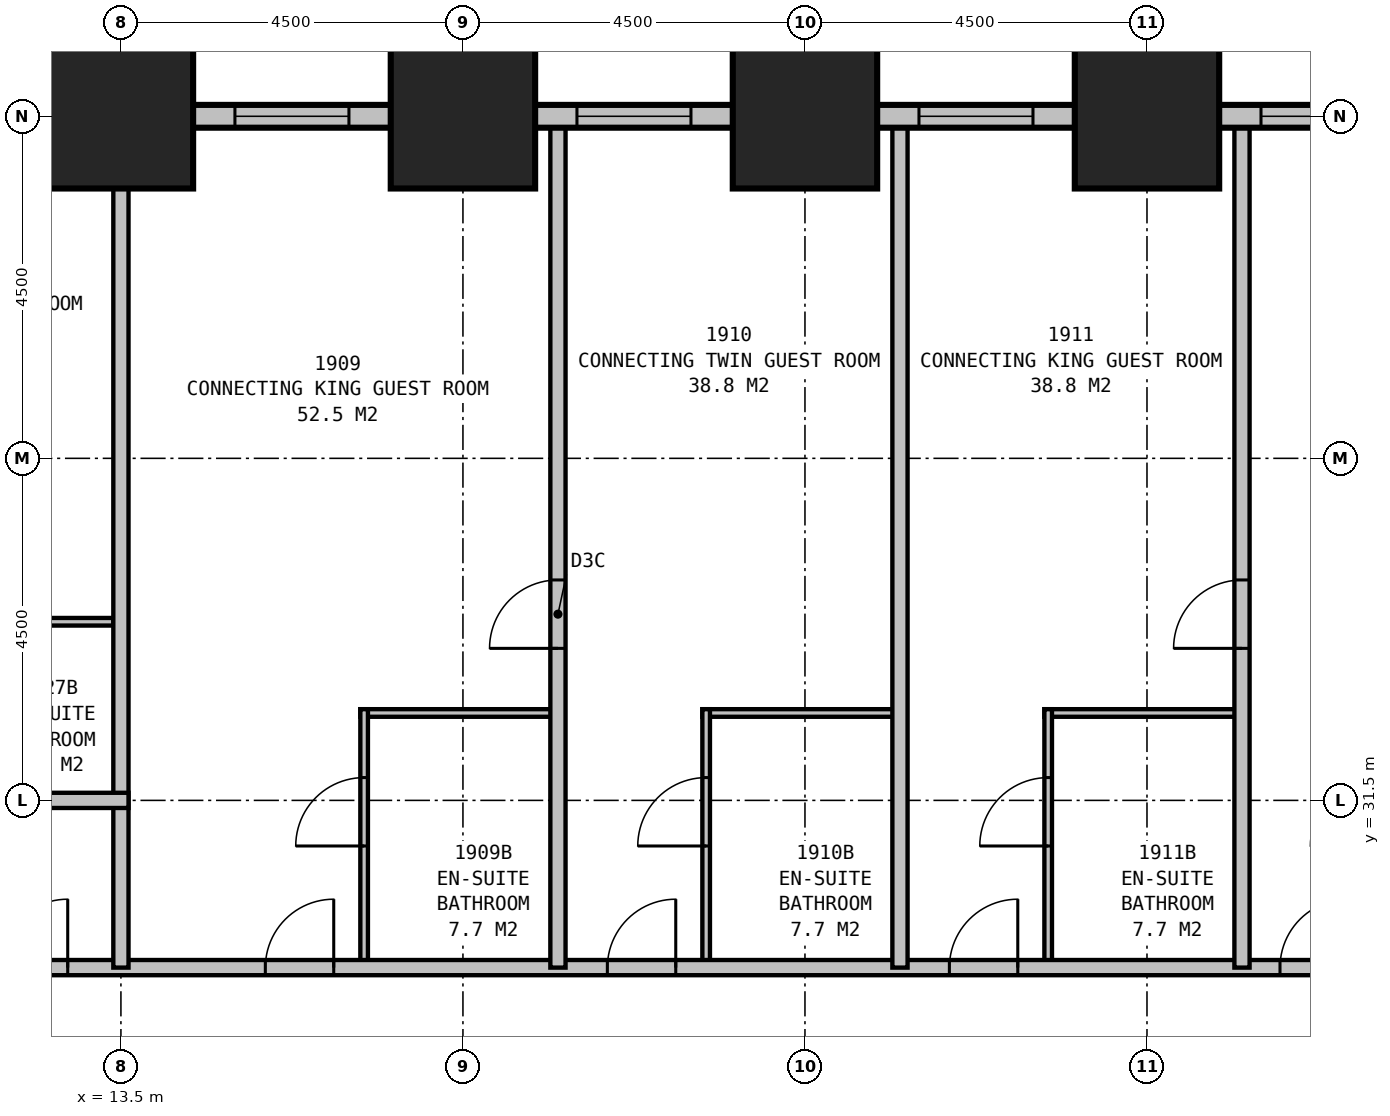
"""IFC4 building model, lengths in metres.
Left out: names, types, materials, properties, quantities, classifications, styles, units other than length and angle.
Written with IfcOpenShell. Run it as: python <this file> out.ifc"""

import sys

from ifc_helpers import new_model, si_unit, direction, frame, frame_2d, origin, origin_2d, place, context, subcontext, project, spatial, rectangle, extrude, element, fill, save


model = new_model("IFC4")
c1 = context("Model", 3, precision=1e-05, world=origin(), true_north=direction((0.0, 1.0)))
c2 = subcontext(c1, "Body", "Model", "MODEL_VIEW")
j1 = project(units=[si_unit("LENGTHUNIT", "METRE"), si_unit("PLANEANGLEUNIT", "RADIAN")], contexts=[c1])
p1 = place(None, origin())
s1 = spatial("IfcSite", under=j1, at=p1, CompositionType="ELEMENT")
p2 = place(p1, origin())
s2 = spatial("IfcBuilding", under=s1, at=p2, CompositionType="ELEMENT")
p3 = place(p2, frame((0.0, 0.0, 78.7)))
s3 = spatial("IfcBuildingStorey", under=s2, at=p3, CompositionType="ELEMENT", Elevation=78.7)
for number, where, z_axis, x_axis in (
    (1, (27.0, 40.5, 0.0), (0.0, 0.0, 1.0), (1.0, 0.0, 0.0)),
    (2, (22.5, 40.5, 0.0), (0.0, 0.0, 1.0), (1.0, 0.0, 0.0)),
    (3, (18.0, 40.5, 0.0), (0.0, 0.0, 1.0), (1.0, 0.0, 0.0)),
    (4, (13.5, 40.5, 0.0), (0.0, 0.0, 1.0), (1.0, 0.0, 0.0)),
):
    element("IfcColumn", number, at=place(p3, frame(where, z_axis=z_axis, x_axis=x_axis)), inside=s3, PredefinedType="COLUMN", context=c2, shape_type="SweptSolid", body=[
        extrude(rectangle(XDim=1.9, YDim=1.9, at=origin_2d()), origin(), (0.0, 0.0, 1.0), 3.5),
    ])
p4 = place(p3, frame((40.65, 40.5, 0.0), z_axis=(0.0, 0.0, 1.0), x_axis=(-1.0, 0.0, 0.0)))
e5 = element("IfcWall", 5, at=p4, inside=s3, PredefinedType="STANDARD", context=c2, shape_type="SweptSolid", body=[
    extrude(rectangle(XDim=31.8, YDim=0.3, at=frame_2d((15.9, 0.0))), origin(), (0.0, 0.0, 1.0), 2.05),
])
p5 = place(p4, frame((1.65, 0.0, 0.5)))
e6 = element("IfcOpeningElement", 6, at=p5, cuts=e5, PredefinedType="OPENING", context=c2, shape_type="SweptSolid", body=[
    extrude(rectangle(XDim=1.5, YDim=1.4, at=frame_2d((0.75, 0.7))), frame((0.0, 0.16, 0.0), z_axis=(0.0, -1.0, 0.0), x_axis=(1.0, 0.0, 0.0)), (0.0, 0.0, 1.0), 0.32),
])
p6 = place(p4, frame((6.15, 0.0, 0.5)))
e7 = element("IfcOpeningElement", 7, at=p6, cuts=e5, PredefinedType="OPENING", context=c2, shape_type="SweptSolid", body=[
    extrude(rectangle(XDim=1.5, YDim=1.4, at=frame_2d((0.75, 0.7))), frame((0.0, 0.16, 0.0), z_axis=(0.0, -1.0, 0.0), x_axis=(1.0, 0.0, 0.0)), (0.0, 0.0, 1.0), 0.32),
])
p7 = place(p4, frame((10.65, 0.0, 0.5)))
e8 = element("IfcOpeningElement", 8, at=p7, cuts=e5, PredefinedType="OPENING", context=c2, shape_type="SweptSolid", body=[
    extrude(rectangle(XDim=1.5, YDim=1.4, at=frame_2d((0.75, 0.7))), frame((0.0, 0.16, 0.0), z_axis=(0.0, -1.0, 0.0), x_axis=(1.0, 0.0, 0.0)), (0.0, 0.0, 1.0), 0.32),
])
p8 = place(p4, frame((15.15, 0.0, 0.5)))
e9 = element("IfcOpeningElement", 9, at=p8, cuts=e5, PredefinedType="OPENING", context=c2, shape_type="SweptSolid", body=[
    extrude(rectangle(XDim=1.5, YDim=1.4, at=frame_2d((0.75, 0.7))), frame((0.0, 0.16, 0.0), z_axis=(0.0, -1.0, 0.0), x_axis=(1.0, 0.0, 0.0)), (0.0, 0.0, 1.0), 0.32),
])
p9 = place(p4, frame((19.65, 0.0, 0.5)))
e10 = element("IfcOpeningElement", 10, at=p9, cuts=e5, PredefinedType="OPENING", context=c2, shape_type="SweptSolid", body=[
    extrude(rectangle(XDim=1.5, YDim=1.4, at=frame_2d((0.75, 0.7))), frame((0.0, 0.16, 0.0), z_axis=(0.0, -1.0, 0.0), x_axis=(1.0, 0.0, 0.0)), (0.0, 0.0, 1.0), 0.32),
])
p10 = place(p4, frame((24.15, 0.0, 0.5)))
e11 = element("IfcOpeningElement", 11, at=p10, cuts=e5, PredefinedType="OPENING", context=c2, shape_type="SweptSolid", body=[
    extrude(rectangle(XDim=1.5, YDim=1.4, at=frame_2d((0.75, 0.7))), frame((0.0, 0.16, 0.0), z_axis=(0.0, -1.0, 0.0), x_axis=(1.0, 0.0, 0.0)), (0.0, 0.0, 1.0), 0.32),
])
p11 = place(p4, frame((28.65, 0.0, 0.5)))
e12 = element("IfcOpeningElement", 12, at=p11, cuts=e5, PredefinedType="OPENING", context=c2, shape_type="SweptSolid", body=[
    extrude(rectangle(XDim=1.5, YDim=1.4, at=frame_2d((0.75, 0.7))), frame((0.0, 0.16, 0.0), z_axis=(0.0, -1.0, 0.0), x_axis=(1.0, 0.0, 0.0)), (0.0, 0.0, 1.0), 0.32),
])
p12 = place(p3, frame((11.2, 29.3, 0.0), z_axis=(0.0, 0.0, 1.0), x_axis=(1.0, 0.0, 0.0)))
e13 = element("IfcWall", 13, at=p12, inside=s3, PredefinedType="PARTITIONING", context=c2, shape_type="SweptSolid", body=[
    extrude(rectangle(XDim=27.1, YDim=0.2, at=frame_2d((13.55, 0.0))), origin(), (0.0, 0.0, 1.0), 3.25),
])
p13 = place(p12, frame((4.2, 0.0, 0.0)))
e14 = element("IfcOpeningElement", 14, at=p13, cuts=e13, PredefinedType="OPENING", context=c2, shape_type="SweptSolid", body=[
    extrude(rectangle(XDim=0.9, YDim=2.1, at=frame_2d((0.45, 1.05))), frame((0.0, 0.11, 0.0), z_axis=(0.0, -1.0, 0.0), x_axis=(1.0, 0.0, 0.0)), (0.0, 0.0, 1.0), 0.22),
])
p14 = place(p12, frame((8.7, 0.0, 0.0)))
e15 = element("IfcOpeningElement", 15, at=p14, cuts=e13, PredefinedType="OPENING", context=c2, shape_type="SweptSolid", body=[
    extrude(rectangle(XDim=0.9, YDim=2.1, at=frame_2d((0.45, 1.05))), frame((0.0, 0.11, 0.0), z_axis=(0.0, -1.0, 0.0), x_axis=(1.0, 0.0, 0.0)), (0.0, 0.0, 1.0), 0.22),
])
p15 = place(p12, frame((13.2, 0.0, 0.0)))
e16 = element("IfcOpeningElement", 16, at=p15, cuts=e13, PredefinedType="OPENING", context=c2, shape_type="SweptSolid", body=[
    extrude(rectangle(XDim=0.9, YDim=2.1, at=frame_2d((0.45, 1.05))), frame((0.0, 0.11, 0.0), z_axis=(0.0, -1.0, 0.0), x_axis=(1.0, 0.0, 0.0)), (0.0, 0.0, 1.0), 0.22),
])
p16 = place(p12, frame((17.55, 0.0, 0.0)))
e17 = element("IfcOpeningElement", 17, at=p16, cuts=e13, PredefinedType="OPENING", context=c2, shape_type="SweptSolid", body=[
    extrude(rectangle(XDim=0.9, YDim=2.1, at=frame_2d((0.45, 1.05))), frame((0.0, 0.11, 0.0), z_axis=(0.0, -1.0, 0.0), x_axis=(1.0, 0.0, 0.0)), (0.0, 0.0, 1.0), 0.22),
])
p17 = place(p12, frame((23.1, 0.0, 0.0)))
e18 = element("IfcOpeningElement", 18, at=p17, cuts=e13, PredefinedType="OPENING", context=c2, shape_type="SweptSolid", body=[
    extrude(rectangle(XDim=1.0, YDim=2.1, at=frame_2d((0.5, 1.05))), frame((0.0, 0.11, 0.0), z_axis=(0.0, -1.0, 0.0), x_axis=(1.0, 0.0, 0.0)), (0.0, 0.0, 1.0), 0.22),
])
p18 = place(p12, frame((25.5, 0.0, 0.0)))
e19 = element("IfcOpeningElement", 19, at=p18, cuts=e13, PredefinedType="OPENING", context=c2, shape_type="SweptSolid", body=[
    extrude(rectangle(XDim=0.9, YDim=2.1, at=frame_2d((0.45, 1.05))), frame((0.0, 0.11, 0.0), z_axis=(0.0, -1.0, 0.0), x_axis=(1.0, 0.0, 0.0)), (0.0, 0.0, 1.0), 0.22),
])
p19 = place(p12, frame((0.7, 0.0, 0.0)))
e20 = element("IfcOpeningElement", 20, at=p19, cuts=e13, PredefinedType="OPENING", context=c2, shape_type="SweptSolid", body=[
    extrude(rectangle(XDim=0.9, YDim=2.1, at=frame_2d((0.45, 1.05))), frame((0.0, 0.11, 0.0), z_axis=(0.0, -1.0, 0.0), x_axis=(1.0, 0.0, 0.0)), (0.0, 0.0, 1.0), 0.22),
])
p20 = place(p3, frame((19.25, 29.3, 0.0), z_axis=(0.0, 0.0, 1.0), x_axis=(0.0, 1.0, 0.0)))
e21 = element("IfcWall", 21, at=p20, inside=s3, PredefinedType="PARTITIONING", context=c2, shape_type="SweptSolid", body=[
    extrude(rectangle(XDim=11.2, YDim=0.2, at=frame_2d((5.6, 0.0))), origin(), (0.0, 0.0, 1.0), 3.25),
])
p21 = place(p20, frame((4.2, 0.0, 0.0)))
e22 = element("IfcOpeningElement", 22, at=p21, cuts=e21, PredefinedType="OPENING", context=c2, shape_type="SweptSolid", body=[
    extrude(rectangle(XDim=0.9, YDim=2.1, at=frame_2d((0.45, 1.05))), frame((0.0, 0.11, 0.0), z_axis=(0.0, -1.0, 0.0), x_axis=(1.0, 0.0, 0.0)), (0.0, 0.0, 1.0), 0.22),
])
p22 = place(p3, frame((23.75, 29.3, 0.0), z_axis=(0.0, 0.0, 1.0), x_axis=(0.0, 1.0, 0.0)))
e23 = element("IfcWall", 23, at=p22, inside=s3, PredefinedType="PARTITIONING", context=c2, shape_type="SweptSolid", body=[
    extrude(rectangle(XDim=11.2, YDim=0.2, at=frame_2d((5.6, 0.0))), origin(), (0.0, 0.0, 1.0), 3.25),
])
p23 = place(p3, frame((28.25, 29.3, 0.0), z_axis=(0.0, 0.0, 1.0), x_axis=(0.0, 1.0, 0.0)))
e24 = element("IfcWall", 24, at=p23, inside=s3, PredefinedType="PARTITIONING", context=c2, shape_type="SweptSolid", body=[
    extrude(rectangle(XDim=11.2, YDim=0.2, at=frame_2d((5.6, 0.0))), origin(), (0.0, 0.0, 1.0), 3.25),
])
p24 = place(p23, frame((4.2, 0.0, 0.0)))
e25 = element("IfcOpeningElement", 25, at=p24, cuts=e24, PredefinedType="OPENING", context=c2, shape_type="SweptSolid", body=[
    extrude(rectangle(XDim=0.9, YDim=2.1, at=frame_2d((0.45, 1.05))), frame((0.0, 0.11, 0.0), z_axis=(0.0, -1.0, 0.0), x_axis=(1.0, 0.0, 0.0)), (0.0, 0.0, 1.0), 0.22),
])
p25 = place(p3, frame((16.65, 32.65, 0.0), z_axis=(0.0, 0.0, 1.0), x_axis=(1.0, 0.0, 0.0)))
e26 = element("IfcWall", 26, at=p25, inside=s3, PredefinedType="PLUMBINGWALL", context=c2, shape_type="SweptSolid", body=[
    extrude(rectangle(XDim=2.6, YDim=0.1, at=frame_2d((1.3, 0.0))), origin(), (0.0, 0.0, 1.0), 3.25),
])
p26 = place(p3, frame((16.7, 29.3, 0.0), z_axis=(0.0, 0.0, 1.0), x_axis=(0.0, 1.0, 0.0)))
e27 = element("IfcWall", 27, at=p26, inside=s3, PredefinedType="PLUMBINGWALL", context=c2, shape_type="SweptSolid", body=[
    extrude(rectangle(XDim=3.4, YDim=0.1, at=frame_2d((1.7, 0.0))), origin(), (0.0, 0.0, 1.0), 3.25),
])
p27 = place(p26, frame((1.6, 0.0, 0.0)))
e28 = element("IfcOpeningElement", 28, at=p27, cuts=e27, PredefinedType="OPENING", context=c2, shape_type="SweptSolid", body=[
    extrude(rectangle(XDim=0.9, YDim=2.1, at=frame_2d((0.45, 1.05))), frame((0.0, 0.06, 0.0), z_axis=(0.0, -1.0, 0.0), x_axis=(1.0, 0.0, 0.0)), (0.0, 0.0, 1.0), 0.12),
])
p28 = place(p3, frame((21.15, 32.65, 0.0), z_axis=(0.0, 0.0, 1.0), x_axis=(1.0, 0.0, 0.0)))
e29 = element("IfcWall", 29, at=p28, inside=s3, PredefinedType="PLUMBINGWALL", context=c2, shape_type="SweptSolid", body=[
    extrude(rectangle(XDim=2.6, YDim=0.1, at=frame_2d((1.3, 0.0))), origin(), (0.0, 0.0, 1.0), 3.25),
])
p29 = place(p3, frame((21.2, 29.3, 0.0), z_axis=(0.0, 0.0, 1.0), x_axis=(0.0, 1.0, 0.0)))
e30 = element("IfcWall", 30, at=p29, inside=s3, PredefinedType="PLUMBINGWALL", context=c2, shape_type="SweptSolid", body=[
    extrude(rectangle(XDim=3.4, YDim=0.1, at=frame_2d((1.7, 0.0))), origin(), (0.0, 0.0, 1.0), 3.25),
])
p30 = place(p29, frame((1.6, 0.0, 0.0)))
e31 = element("IfcOpeningElement", 31, at=p30, cuts=e30, PredefinedType="OPENING", context=c2, shape_type="SweptSolid", body=[
    extrude(rectangle(XDim=0.9, YDim=2.1, at=frame_2d((0.45, 1.05))), frame((0.0, 0.06, 0.0), z_axis=(0.0, -1.0, 0.0), x_axis=(1.0, 0.0, 0.0)), (0.0, 0.0, 1.0), 0.12),
])
p31 = place(p3, frame((25.65, 32.65, 0.0), z_axis=(0.0, 0.0, 1.0), x_axis=(1.0, 0.0, 0.0)))
e32 = element("IfcWall", 32, at=p31, inside=s3, PredefinedType="PLUMBINGWALL", context=c2, shape_type="SweptSolid", body=[
    extrude(rectangle(XDim=2.6, YDim=0.1, at=frame_2d((1.3, 0.0))), origin(), (0.0, 0.0, 1.0), 3.25),
])
p32 = place(p3, frame((25.7, 29.3, 0.0), z_axis=(0.0, 0.0, 1.0), x_axis=(0.0, 1.0, 0.0)))
e33 = element("IfcWall", 33, at=p32, inside=s3, PredefinedType="PLUMBINGWALL", context=c2, shape_type="SweptSolid", body=[
    extrude(rectangle(XDim=3.4, YDim=0.1, at=frame_2d((1.7, 0.0))), origin(), (0.0, 0.0, 1.0), 3.25),
])
p33 = place(p32, frame((1.6, 0.0, 0.0)))
e34 = element("IfcOpeningElement", 34, at=p33, cuts=e33, PredefinedType="OPENING", context=c2, shape_type="SweptSolid", body=[
    extrude(rectangle(XDim=0.9, YDim=2.1, at=frame_2d((0.45, 1.05))), frame((0.0, 0.06, 0.0), z_axis=(0.0, -1.0, 0.0), x_axis=(1.0, 0.0, 0.0)), (0.0, 0.0, 1.0), 0.12),
])
p34 = place(p3, frame((13.5, 29.3, 0.0), z_axis=(0.0, 0.0, 1.0), x_axis=(0.0, 1.0, 0.0)))
e35 = element("IfcWall", 35, at=p34, inside=s3, PredefinedType="PARTITIONING", context=c2, shape_type="SweptSolid", body=[
    extrude(rectangle(XDim=11.2, YDim=0.2, at=frame_2d((5.6, 0.0))), origin(), (0.0, 0.0, 1.0), 2.25),
])
p35 = place(p3, frame((13.6, 31.5, 0.0), z_axis=(0.0, 0.0, 1.0), x_axis=(-1.0, 0.0, 0.0)))
e36 = element("IfcWall", 36, at=p35, inside=s3, PredefinedType="PARTITIONING", context=c2, shape_type="SweptSolid", body=[
    extrude(rectangle(XDim=10.099, YDim=0.2, at=frame_2d((5.05, 0.0))), origin(), (0.0, 0.0, 1.0), 3.25),
])
p36 = place(p35, frame((8.999, 0.0, 0.0), z_axis=(0.0, 0.0, 1.0), x_axis=(-1.0, 0.0, 0.0)))
e37 = element("IfcOpeningElement", 37, at=p36, cuts=e36, PredefinedType="OPENING", context=c2, shape_type="SweptSolid", body=[
    extrude(rectangle(XDim=0.9, YDim=2.1, at=frame_2d((0.45, 1.05))), frame((0.0, 0.11, 0.0), z_axis=(0.0, -1.0, 0.0), x_axis=(1.0, 0.0, 0.0)), (0.0, 0.0, 1.0), 0.22),
])
p37 = place(p3, frame((13.4, 33.85, 0.0), z_axis=(0.0, 0.0, 1.0), x_axis=(-1.0, 0.0, 0.0)))
e38 = element("IfcWall", 38, at=p37, inside=s3, PredefinedType="PLUMBINGWALL", context=c2, shape_type="SweptSolid", body=[
    extrude(rectangle(XDim=2.7, YDim=0.1, at=frame_2d((1.35, 0.0))), origin(), (0.0, 0.0, 1.0), 3.25),
])
p38 = place(p37, frame((1.8, 0.0, 0.0), z_axis=(0.0, 0.0, 1.0), x_axis=(-1.0, 0.0, 0.0)))
e39 = element("IfcOpeningElement", 39, at=p38, cuts=e38, PredefinedType="OPENING", context=c2, shape_type="SweptSolid", body=[
    extrude(rectangle(XDim=0.9, YDim=2.1, at=frame_2d((0.45, 1.05))), frame((0.0, 0.06, 0.0), z_axis=(0.0, -1.0, 0.0), x_axis=(1.0, 0.0, 0.0)), (0.0, 0.0, 1.0), 0.12),
])
p39 = place(p7, origin())
e40 = element("IfcWindow", 40, at=p39, inside=s3, PartitioningType="SINGLE_PANEL", PredefinedType="WINDOW", context=c2, shape_type="SweptSolid", body=[
    extrude(rectangle(XDim=1.5, YDim=1.4, at=frame_2d((0.75, 0.7))), frame((0.0, 0.03, 0.0), z_axis=(0.0, -1.0, 0.0), x_axis=(1.0, 0.0, 0.0)), (0.0, 0.0, 1.0), 0.06),
])
fill(e8, e40)
p40 = place(p8, origin())
e41 = element("IfcWindow", 41, at=p40, inside=s3, PartitioningType="SINGLE_PANEL", PredefinedType="WINDOW", context=c2, shape_type="SweptSolid", body=[
    extrude(rectangle(XDim=1.5, YDim=1.4, at=frame_2d((0.75, 0.7))), frame((0.0, 0.03, 0.0), z_axis=(0.0, -1.0, 0.0), x_axis=(1.0, 0.0, 0.0)), (0.0, 0.0, 1.0), 0.06),
])
fill(e9, e41)
p41 = place(p9, origin())
e42 = element("IfcWindow", 42, at=p41, inside=s3, PartitioningType="SINGLE_PANEL", PredefinedType="WINDOW", context=c2, shape_type="SweptSolid", body=[
    extrude(rectangle(XDim=1.5, YDim=1.4, at=frame_2d((0.75, 0.7))), frame((0.0, 0.03, 0.0), z_axis=(0.0, -1.0, 0.0), x_axis=(1.0, 0.0, 0.0)), (0.0, 0.0, 1.0), 0.06),
])
fill(e10, e42)
p42 = place(p10, origin())
e43 = element("IfcWindow", 43, at=p42, inside=s3, PartitioningType="SINGLE_PANEL", PredefinedType="WINDOW", context=c2, shape_type="SweptSolid", body=[
    extrude(rectangle(XDim=1.5, YDim=1.4, at=frame_2d((0.75, 0.7))), frame((0.0, 0.03, 0.0), z_axis=(0.0, -1.0, 0.0), x_axis=(1.0, 0.0, 0.0)), (0.0, 0.0, 1.0), 0.06),
])
fill(e11, e43)
p43 = place(p13, origin())
e44 = element("IfcDoor", 44, at=p43, inside=s3, OperationType="SINGLE_SWING_RIGHT", PredefinedType="DOOR", context=c2, shape_type="SweptSolid", body=[
    extrude(rectangle(XDim=0.9, YDim=2.1, at=frame_2d((0.45, 1.05))), frame((0.0, 0.025, 0.0), z_axis=(0.0, -1.0, 0.0), x_axis=(1.0, 0.0, 0.0)), (0.0, 0.0, 1.0), 0.05),
])
fill(e14, e44)
p44 = place(p14, origin())
e45 = element("IfcDoor", 45, at=p44, inside=s3, OperationType="SINGLE_SWING_RIGHT", PredefinedType="DOOR", context=c2, shape_type="SweptSolid", body=[
    extrude(rectangle(XDim=0.9, YDim=2.1, at=frame_2d((0.45, 1.05))), frame((0.0, 0.025, 0.0), z_axis=(0.0, -1.0, 0.0), x_axis=(1.0, 0.0, 0.0)), (0.0, 0.0, 1.0), 0.05),
])
fill(e15, e45)
p45 = place(p15, origin())
e46 = element("IfcDoor", 46, at=p45, inside=s3, OperationType="SINGLE_SWING_RIGHT", PredefinedType="DOOR", context=c2, shape_type="SweptSolid", body=[
    extrude(rectangle(XDim=0.9, YDim=2.1, at=frame_2d((0.45, 1.05))), frame((0.0, 0.025, 0.0), z_axis=(0.0, -1.0, 0.0), x_axis=(1.0, 0.0, 0.0)), (0.0, 0.0, 1.0), 0.05),
])
fill(e16, e46)
p46 = place(p16, origin())
e47 = element("IfcDoor", 47, at=p46, inside=s3, OperationType="SINGLE_SWING_RIGHT", PredefinedType="DOOR", context=c2, shape_type="SweptSolid", body=[
    extrude(rectangle(XDim=0.9, YDim=2.1, at=frame_2d((0.45, 1.05))), frame((0.0, 0.025, 0.0), z_axis=(0.0, -1.0, 0.0), x_axis=(1.0, 0.0, 0.0)), (0.0, 0.0, 1.0), 0.05),
])
fill(e17, e47)
p47 = place(p19, origin())
e48 = element("IfcDoor", 48, at=p47, inside=s3, OperationType="SINGLE_SWING_RIGHT", PredefinedType="DOOR", context=c2, shape_type="SweptSolid", body=[
    extrude(rectangle(XDim=0.9, YDim=2.1, at=frame_2d((0.45, 1.05))), frame((0.0, 0.025, 0.0), z_axis=(0.0, -1.0, 0.0), x_axis=(1.0, 0.0, 0.0)), (0.0, 0.0, 1.0), 0.05),
])
fill(e20, e48)
p48 = place(p21, origin())
e49 = element("IfcDoor", 49, at=p48, inside=s3, OperationType="SINGLE_SWING_LEFT", PredefinedType="DOOR", context=c2, shape_type="SweptSolid", body=[
    extrude(rectangle(XDim=0.9, YDim=2.1, at=frame_2d((0.45, 1.05))), frame((0.0, 0.025, 0.0), z_axis=(0.0, -1.0, 0.0), x_axis=(1.0, 0.0, 0.0)), (0.0, 0.0, 1.0), 0.05),
])
fill(e22, e49)
p49 = place(p24, origin())
e50 = element("IfcDoor", 50, at=p49, inside=s3, OperationType="SINGLE_SWING_LEFT", PredefinedType="DOOR", context=c2, shape_type="SweptSolid", body=[
    extrude(rectangle(XDim=0.9, YDim=2.1, at=frame_2d((0.45, 1.05))), frame((0.0, 0.025, 0.0), z_axis=(0.0, -1.0, 0.0), x_axis=(1.0, 0.0, 0.0)), (0.0, 0.0, 1.0), 0.05),
])
fill(e25, e50)
p50 = place(p27, origin())
e51 = element("IfcDoor", 51, at=p50, inside=s3, OperationType="SINGLE_SWING_LEFT", PredefinedType="DOOR", context=c2, shape_type="SweptSolid", body=[
    extrude(rectangle(XDim=0.9, YDim=2.1, at=frame_2d((0.45, 1.05))), frame((0.0, 0.025, 0.0), z_axis=(0.0, -1.0, 0.0), x_axis=(1.0, 0.0, 0.0)), (0.0, 0.0, 1.0), 0.05),
])
fill(e28, e51)
p51 = place(p30, origin())
e52 = element("IfcDoor", 52, at=p51, inside=s3, OperationType="SINGLE_SWING_LEFT", PredefinedType="DOOR", context=c2, shape_type="SweptSolid", body=[
    extrude(rectangle(XDim=0.9, YDim=2.1, at=frame_2d((0.45, 1.05))), frame((0.0, 0.025, 0.0), z_axis=(0.0, -1.0, 0.0), x_axis=(1.0, 0.0, 0.0)), (0.0, 0.0, 1.0), 0.05),
])
fill(e31, e52)
p52 = place(p33, origin())
e53 = element("IfcDoor", 53, at=p52, inside=s3, OperationType="SINGLE_SWING_LEFT", PredefinedType="DOOR", context=c2, shape_type="SweptSolid", body=[
    extrude(rectangle(XDim=0.9, YDim=2.1, at=frame_2d((0.45, 1.05))), frame((0.0, 0.025, 0.0), z_axis=(0.0, -1.0, 0.0), x_axis=(1.0, 0.0, 0.0)), (0.0, 0.0, 1.0), 0.05),
])
fill(e34, e53)
save(model, sys.argv[1])
